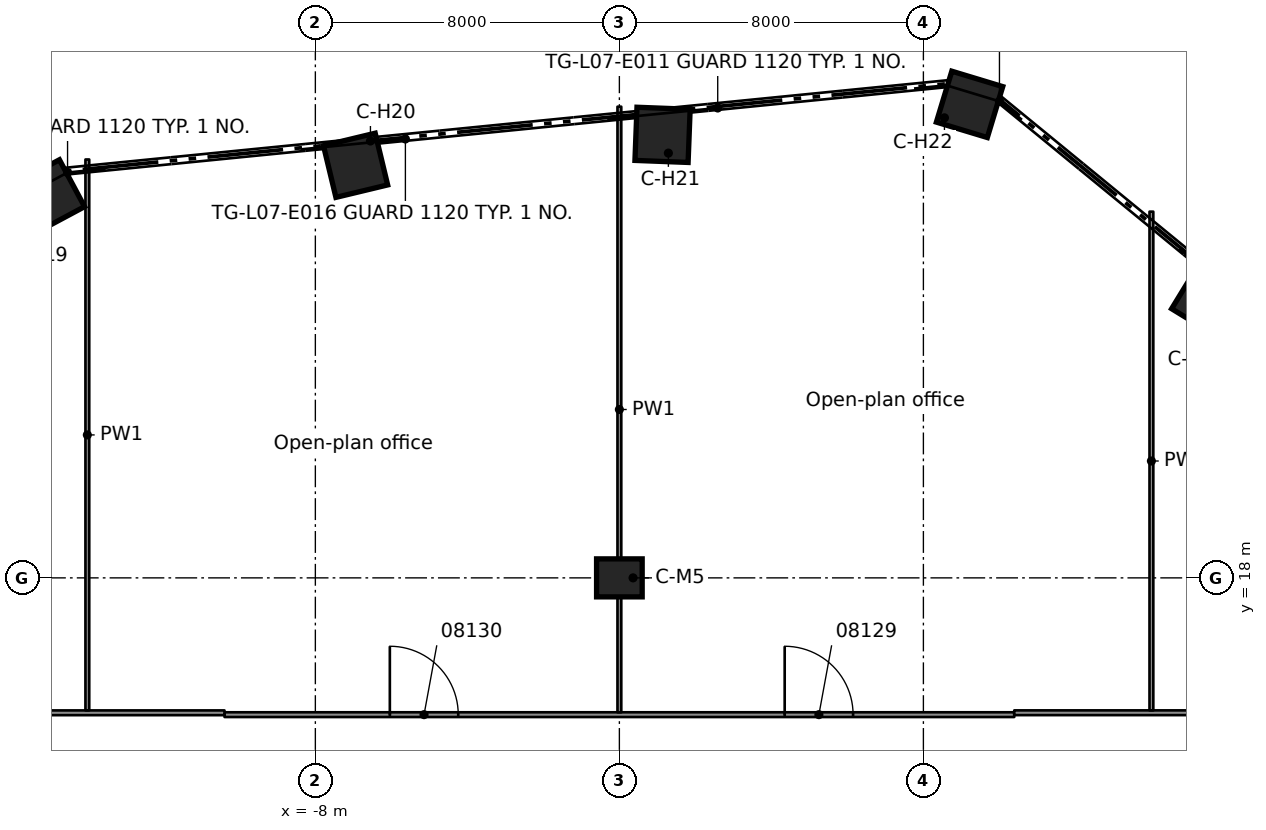
"""IFC4 building model, lengths in metres.
Left out: names, types, materials, properties, quantities, classifications, styles, units other than length and angle.
Written with IfcOpenShell. Run it as: python <this file> out.ifc"""

import sys

from ifc_helpers import new_model, si_unit, direction, frame, frame_2d, origin, origin_2d, place, context, subcontext, project, spatial, rectangle, extrude, element, fill, save


model = new_model("IFC4")
c1 = context("Model", 3, precision=1e-05, world=origin(), true_north=direction((0.0, 1.0)))
c2 = subcontext(c1, "Body", "Model", "MODEL_VIEW")
j1 = project(units=[si_unit("LENGTHUNIT", "METRE"), si_unit("PLANEANGLEUNIT", "RADIAN")], contexts=[c1])
p1 = place(None, origin())
s1 = spatial("IfcSite", under=j1, at=p1, CompositionType="ELEMENT")
p2 = place(p1, origin())
s2 = spatial("IfcBuilding", under=s1, at=p2, CompositionType="ELEMENT")
p3 = place(p2, frame((0.0, 0.0, 37.3)))
s3 = spatial("IfcBuildingStorey", under=s2, at=p3, CompositionType="ELEMENT", Elevation=37.3)
for number, where, z_axis, x_axis in (
    (1, (-15.021, 28.054, 0.0), (0.0, 0.0, 1.0), (-0.472, 0.882, 0.0)),
    (2, (-6.942, 28.856, 0.0), (0.0, 0.0, 1.0), (-0.234, 0.972, 0.0)),
    (3, (1.136, 29.657, 0.0), (0.0, 0.0, 1.0), (0.038, 0.999, 0.0)),
    (4, (9.215, 30.459, 0.0), (0.0, 0.0, 1.0), (0.29, 0.957, 0.0)),
    (5, (15.495, 25.313, 0.0), (0.0, 0.0, 1.0), (0.522, 0.853, 0.0)),
):
    element("IfcColumn", number, at=place(p3, frame(where, z_axis=z_axis, x_axis=x_axis)), inside=s3, PredefinedType="COLUMN", context=c2, shape_type="SweptSolid", body=[
        extrude(rectangle(XDim=1.4, YDim=1.4, at=origin_2d()), origin(), (0.0, 0.0, 1.0), 3.5),
    ])
p4 = place(p3, frame((0.0, 18.0, 0.0), z_axis=(0.0, 0.0, 1.0), x_axis=(1.0, 0.0, 0.0)))
e6 = element("IfcColumn", 6, at=p4, inside=s3, PredefinedType="COLUMN", context=c2, shape_type="SweptSolid", body=[
    extrude(rectangle(XDim=1.2, YDim=1.0, at=origin_2d()), origin(), (0.0, 0.0, 1.0), 3.5),
])
p5 = place(p3, frame((-10.39, 14.401, 0.0), z_axis=(0.0, 0.0, 1.0), x_axis=(1.0, 0.0, 0.0)))
e7 = element("IfcWall", 7, at=p5, inside=s3, PredefinedType="PARTITIONING", context=c2, shape_type="SweptSolid", body=[
    extrude(rectangle(XDim=20.781, YDim=0.125, at=frame_2d((10.391, 0.0))), origin(), (0.0, 0.0, 1.0), 3.06),
])
p6 = place(p5, frame((14.74, 0.0, 0.0)))
e8 = element("IfcOpeningElement", 8, at=p6, cuts=e7, PredefinedType="OPENING", context=c2, shape_type="SweptSolid", body=[
    extrude(rectangle(XDim=1.8, YDim=2.1, at=frame_2d((0.9, 1.05))), frame((0.0, 0.073, 0.0), z_axis=(0.0, -1.0, 0.0), x_axis=(1.0, 0.0, 0.0)), (0.0, 0.0, 1.0), 0.145),
])
p7 = place(p5, frame((4.35, 0.0, 0.0)))
e9 = element("IfcOpeningElement", 9, at=p7, cuts=e7, PredefinedType="OPENING", context=c2, shape_type="SweptSolid", body=[
    extrude(rectangle(XDim=1.8, YDim=2.1, at=frame_2d((0.9, 1.05))), frame((0.0, 0.073, 0.0), z_axis=(0.0, -1.0, 0.0), x_axis=(1.0, 0.0, 0.0)), (0.0, 0.0, 1.0), 0.145),
])
p8 = place(p3, frame((-24.731, 14.45, 0.0), z_axis=(0.0, 0.0, 1.0), x_axis=(1.0, 0.0, 0.0)))
e10 = element("IfcWall", 10, at=p8, inside=s3, PredefinedType="PARTITIONING", context=c2, shape_type="SweptSolid", body=[
    extrude(rectangle(XDim=14.34, YDim=0.125, at=frame_2d((7.17, 0.0))), origin(), (0.0, 0.0, 1.0), 3.06),
])
p9 = place(p8, frame((6.131, 0.0, 0.0)))
e11 = element("IfcOpeningElement", 11, at=p9, cuts=e10, PredefinedType="OPENING", context=c2, shape_type="SweptSolid", body=[
    extrude(rectangle(XDim=1.8, YDim=2.1, at=frame_2d((0.9, 1.05))), frame((0.0, 0.073, 0.0), z_axis=(0.0, -1.0, 0.0), x_axis=(1.0, 0.0, 0.0)), (0.0, 0.0, 1.0), 0.145),
])
p10 = place(p3, frame((10.391, 14.451, 0.0), z_axis=(0.0, 0.0, 1.0), x_axis=(1.0, 0.0, 0.0)))
e12 = element("IfcWall", 12, at=p10, inside=s3, PredefinedType="PARTITIONING", context=c2, shape_type="SweptSolid", body=[
    extrude(rectangle(XDim=10.996, YDim=0.125, at=frame_2d((5.498, 0.0))), origin(), (0.0, 0.0, 1.0), 3.06),
])
p11 = place(p3, frame((14.0, 14.514, 0.0), z_axis=(0.0, 0.0, 1.0), x_axis=(0.0, 1.0, 0.0)))
e13 = element("IfcWall", 13, at=p11, inside=s3, PredefinedType="PARTITIONING", context=c2, shape_type="SweptSolid", body=[
    extrude(rectangle(XDim=13.122, YDim=0.1, at=frame_2d((6.561, 0.0))), origin(), (0.0, 0.0, 1.0), 3.06),
])
p12 = place(p3, frame((0.0, 14.463, 0.0), z_axis=(0.0, 0.0, 1.0), x_axis=(0.0, 1.0, 0.0)))
e14 = element("IfcWall", 14, at=p12, inside=s3, PredefinedType="PARTITIONING", context=c2, shape_type="SweptSolid", body=[
    extrude(rectangle(XDim=15.935, YDim=0.1, at=frame_2d((7.968, 0.0))), origin(), (0.0, 0.0, 1.0), 3.06),
])
p13 = place(p3, frame((-14.0, 14.514, 0.0), z_axis=(0.0, 0.0, 1.0), x_axis=(0.0, 1.0, 0.0)))
e15 = element("IfcWall", 15, at=p13, inside=s3, PredefinedType="PARTITIONING", context=c2, shape_type="SweptSolid", body=[
    extrude(rectangle(XDim=14.495, YDim=0.1, at=frame_2d((7.248, 0.0))), origin(), (0.0, 0.0, 1.0), 3.06),
])
p14 = place(p6, origin())
e16 = element("IfcDoor", 16, at=p14, inside=s3, OperationType="DOUBLE_DOOR_SINGLE_SWING", PredefinedType="DOOR", context=c2, shape_type="SweptSolid", body=[
    extrude(rectangle(XDim=1.8, YDim=2.1, at=frame_2d((0.9, 1.05))), frame((0.0, 0.025, 0.0), z_axis=(0.0, -1.0, 0.0), x_axis=(1.0, 0.0, 0.0)), (0.0, 0.0, 1.0), 0.05),
])
fill(e8, e16)
p15 = place(p7, origin())
e17 = element("IfcDoor", 17, at=p15, inside=s3, OperationType="DOUBLE_DOOR_SINGLE_SWING", PredefinedType="DOOR", context=c2, shape_type="SweptSolid", body=[
    extrude(rectangle(XDim=1.8, YDim=2.1, at=frame_2d((0.9, 1.05))), frame((0.0, 0.025, 0.0), z_axis=(0.0, -1.0, 0.0), x_axis=(1.0, 0.0, 0.0)), (0.0, 0.0, 1.0), 0.05),
])
fill(e9, e17)
save(model, sys.argv[1])
